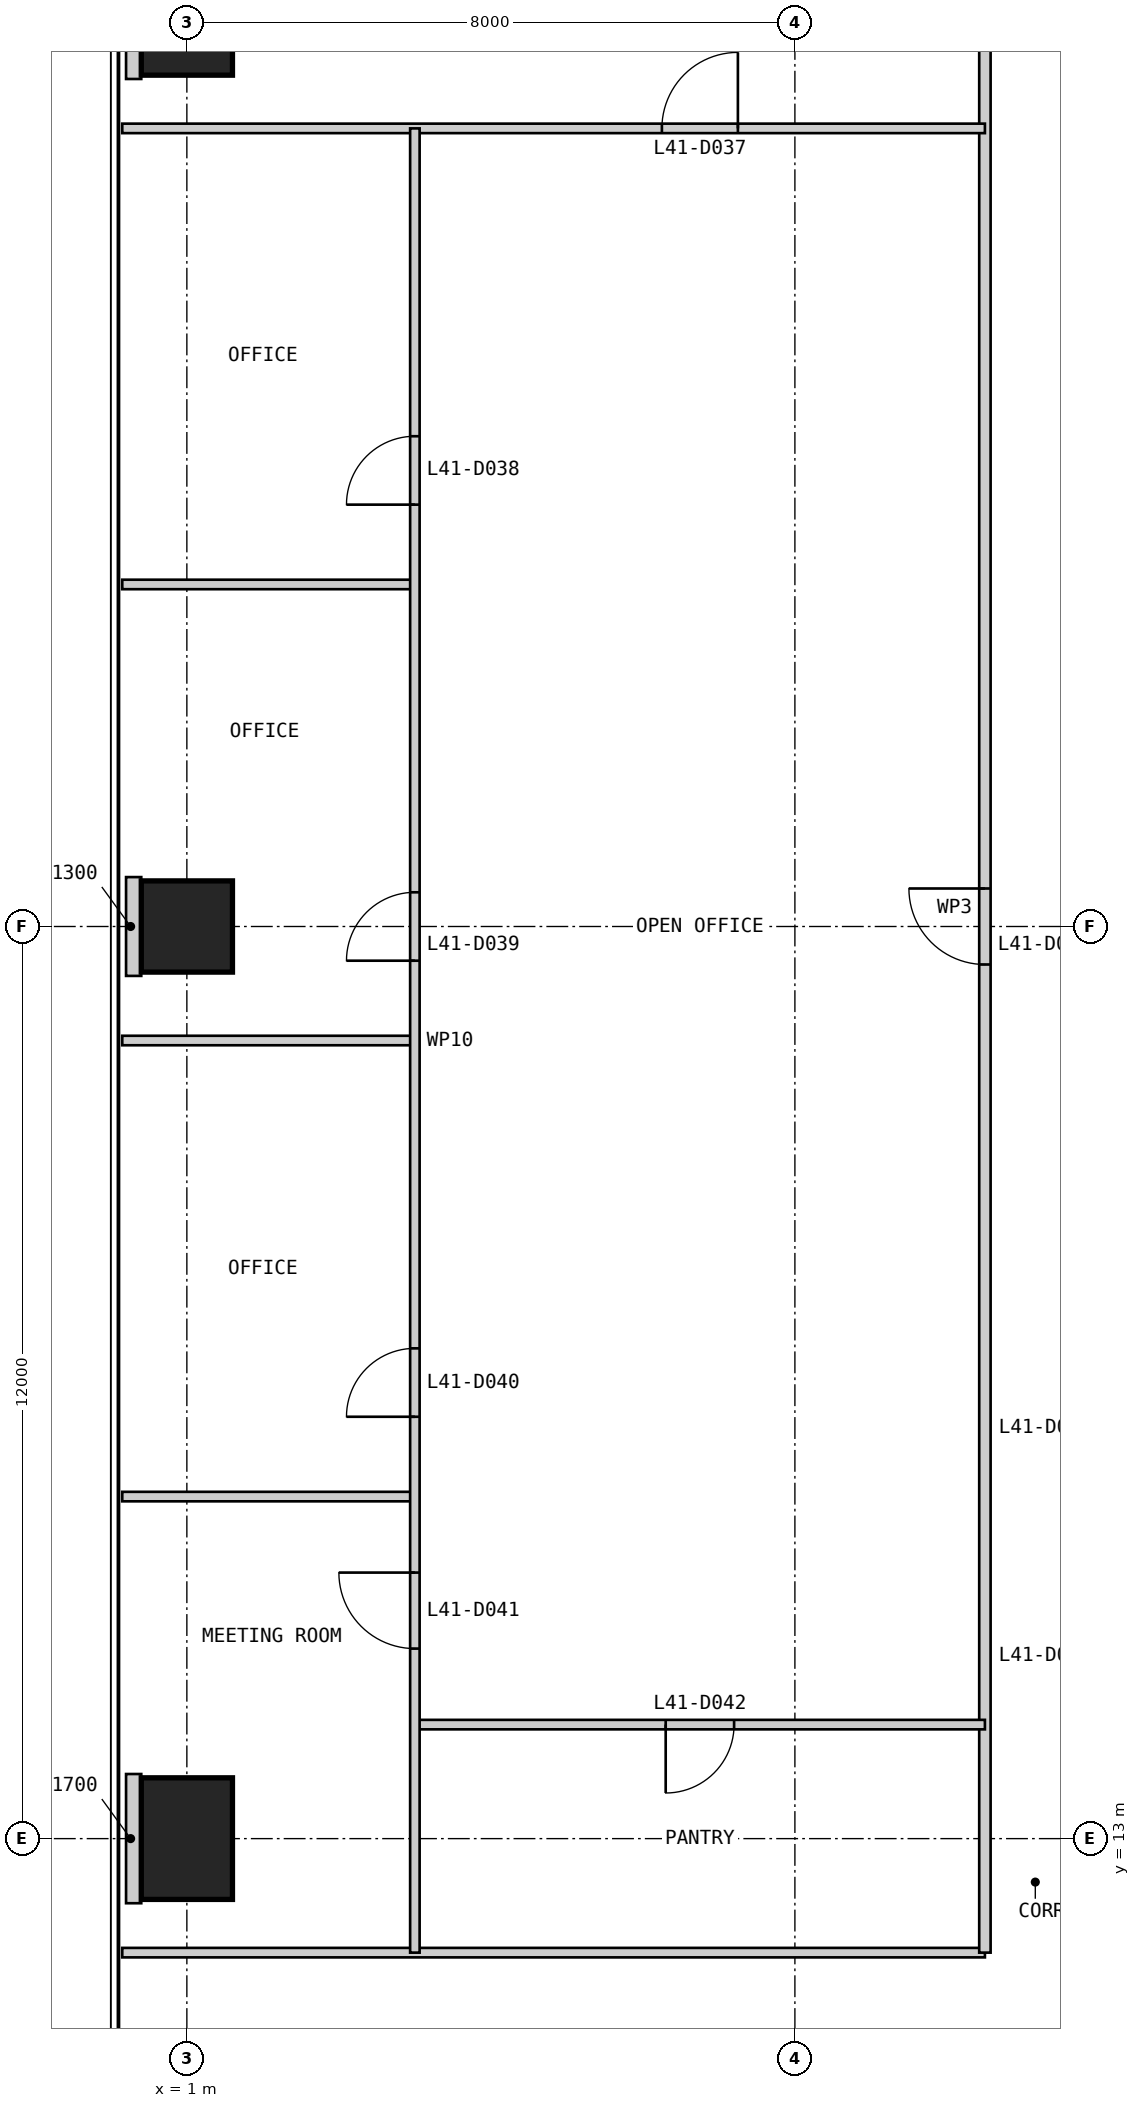
"""IFC4 building model, lengths in metres.
Left out: names, types, materials, properties, quantities, classifications, styles, units other than length and angle.
Written with IfcOpenShell. Run it as: python <this file> out.ifc"""

import sys

from ifc_helpers import new_model, si_unit, direction, frame, frame_2d, origin, origin_2d, place, context, subcontext, project, spatial, rectangle, extrude, element, fill, save


model = new_model("IFC4")
c1 = context("Model", 3, precision=1e-05, world=origin(), true_north=direction((0.0, 1.0)))
c2 = subcontext(c1, "Body", "Model", "MODEL_VIEW")
j1 = project(units=[si_unit("LENGTHUNIT", "METRE"), si_unit("PLANEANGLEUNIT", "RADIAN")], contexts=[c1])
p1 = place(None, origin())
s1 = spatial("IfcSite", under=j1, at=p1, CompositionType="ELEMENT")
p2 = place(p1, origin())
s2 = spatial("IfcBuilding", under=s1, at=p2, CompositionType="ELEMENT")
p3 = place(p2, frame((0.0, 0.0, 177.8)))
s3 = spatial("IfcBuildingStorey", under=s2, at=p3, CompositionType="ELEMENT", Elevation=177.8)
p4 = place(p3, frame((1.0, 37.0, 0.0), z_axis=(0.0, 0.0, 1.0), x_axis=(1.0, 0.0, 0.0)))
e1 = element("IfcColumn", 1, at=p4, inside=s3, PredefinedType="COLUMN", context=c2, shape_type="SweptSolid", body=[
    extrude(rectangle(XDim=1.2, YDim=1.6, at=origin_2d()), origin(), (0.0, 0.0, 1.0), 4.0),
])
p5 = place(p3, frame((1.0, 25.0, 0.0), z_axis=(0.0, 0.0, 1.0), x_axis=(1.0, 0.0, 0.0)))
e2 = element("IfcColumn", 2, at=p5, inside=s3, PredefinedType="COLUMN", context=c2, shape_type="SweptSolid", body=[
    extrude(rectangle(XDim=1.2, YDim=1.2, at=origin_2d()), origin(), (0.0, 0.0, 1.0), 4.0),
])
p6 = place(p3, frame((1.0, 13.0, 0.0), z_axis=(0.0, 0.0, 1.0), x_axis=(1.0, 0.0, 0.0)))
e3 = element("IfcColumn", 3, at=p6, inside=s3, PredefinedType="COLUMN", context=c2, shape_type="SweptSolid", body=[
    extrude(rectangle(XDim=1.2, YDim=1.6, at=origin_2d()), origin(), (0.0, 0.0, 1.0), 4.0),
])
p7 = place(p3, frame((0.15, 11.5, 0.0), z_axis=(0.0, 0.0, 1.0), x_axis=(1.0, 0.0, 0.0)))
e4 = element("IfcWall", 4, at=p7, inside=s3, PredefinedType="PARTITIONING", context=c2, shape_type="SweptSolid", body=[
    extrude(rectangle(XDim=11.35, YDim=0.125, at=frame_2d((5.675, 0.0))), origin(), (0.0, 0.0, 1.0), 3.85),
])
p8 = place(p3, frame((11.5, 38.5, 0.0), z_axis=(0.0, 0.0, 1.0), x_axis=(0.0, -1.0, 0.0)))
e5 = element("IfcWall", 5, at=p8, inside=s3, PredefinedType="PARTITIONING", context=c2, shape_type="SweptSolid", body=[
    extrude(rectangle(XDim=27.0, YDim=0.15, at=frame_2d((13.5, 0.0))), origin(), (0.0, 0.0, 1.0), 3.85),
])
p9 = place(p8, frame((13.0, 0.0, 0.0)))
e6 = element("IfcOpeningElement", 6, at=p9, cuts=e5, PredefinedType="OPENING", context=c2, shape_type="SweptSolid", body=[
    extrude(rectangle(XDim=1.0, YDim=2.2, at=frame_2d((0.5, 1.1))), frame((0.0, 0.085, 0.0), z_axis=(0.0, -1.0, 0.0), x_axis=(1.0, 0.0, 0.0)), (0.0, 0.0, 1.0), 0.17),
])
p10 = place(p3, frame((0.15, 35.5, 0.0), z_axis=(0.0, 0.0, 1.0), x_axis=(1.0, 0.0, 0.0)))
e7 = element("IfcWall", 7, at=p10, inside=s3, PredefinedType="PARTITIONING", context=c2, shape_type="SweptSolid", body=[
    extrude(rectangle(XDim=11.35, YDim=0.125, at=frame_2d((5.675, 0.0))), origin(), (0.0, 0.0, 1.0), 3.85),
])
p11 = place(p10, frame((7.1, 0.0, 0.0)))
e8 = element("IfcOpeningElement", 8, at=p11, cuts=e7, PredefinedType="OPENING", context=c2, shape_type="SweptSolid", body=[
    extrude(rectangle(XDim=1.0, YDim=2.2, at=frame_2d((0.5, 1.1))), frame((0.0, 0.073, 0.0), z_axis=(0.0, -1.0, 0.0), x_axis=(1.0, 0.0, 0.0)), (0.0, 0.0, 1.0), 0.145),
])
for number, where, z_axis, x_axis in (
    (9, (0.15, 29.5, 0.0), (0.0, 0.0, 1.0), (1.0, 0.0, 0.0)),
    (10, (0.15, 23.5, 0.0), (0.0, 0.0, 1.0), (1.0, 0.0, 0.0)),
    (11, (0.15, 17.5, 0.0), (0.0, 0.0, 1.0), (1.0, 0.0, 0.0)),
):
    element("IfcWall", number, at=place(p3, frame(where, z_axis=z_axis, x_axis=x_axis)), inside=s3, PredefinedType="PARTITIONING", context=c2, shape_type="SweptSolid", body=[
        extrude(rectangle(XDim=3.85, YDim=0.125, at=frame_2d((1.925, 0.0))), origin(), (0.0, 0.0, 1.0), 3.85),
    ])
p12 = place(p3, frame((4.0, 14.5, 0.0), z_axis=(0.0, 0.0, 1.0), x_axis=(1.0, 0.0, 0.0)))
e12 = element("IfcWall", 12, at=p12, inside=s3, PredefinedType="PARTITIONING", context=c2, shape_type="SweptSolid", body=[
    extrude(rectangle(XDim=7.5, YDim=0.125, at=frame_2d((3.75, 0.0))), origin(), (0.0, 0.0, 1.0), 3.85),
])
p13 = place(p12, frame((3.3, 0.0, 0.0)))
e13 = element("IfcOpeningElement", 13, at=p13, cuts=e12, PredefinedType="OPENING", context=c2, shape_type="SweptSolid", body=[
    extrude(rectangle(XDim=0.9, YDim=2.2, at=frame_2d((0.45, 1.1))), frame((0.0, 0.073, 0.0), z_axis=(0.0, -1.0, 0.0), x_axis=(1.0, 0.0, 0.0)), (0.0, 0.0, 1.0), 0.145),
])
p14 = place(p3, frame((4.0, 35.5, 0.0), z_axis=(0.0, 0.0, 1.0), x_axis=(0.0, -1.0, 0.0)))
e14 = element("IfcWall", 14, at=p14, inside=s3, PredefinedType="PARTITIONING", context=c2, shape_type="SweptSolid", body=[
    extrude(rectangle(XDim=24.0, YDim=0.125, at=frame_2d((12.0, 0.0))), origin(), (0.0, 0.0, 1.0), 3.238),
])
p15 = place(p14, frame((4.05, 0.0, 0.0)))
e15 = element("IfcOpeningElement", 15, at=p15, cuts=e14, PredefinedType="OPENING", context=c2, shape_type="SweptSolid", body=[
    extrude(rectangle(XDim=0.9, YDim=2.2, at=frame_2d((0.45, 1.1))), frame((0.0, 0.073, 0.0), z_axis=(0.0, -1.0, 0.0), x_axis=(1.0, 0.0, 0.0)), (0.0, 0.0, 1.0), 0.145),
])
p16 = place(p14, frame((10.05, 0.0, 0.0)))
e16 = element("IfcOpeningElement", 16, at=p16, cuts=e14, PredefinedType="OPENING", context=c2, shape_type="SweptSolid", body=[
    extrude(rectangle(XDim=0.9, YDim=2.2, at=frame_2d((0.45, 1.1))), frame((0.0, 0.073, 0.0), z_axis=(0.0, -1.0, 0.0), x_axis=(1.0, 0.0, 0.0)), (0.0, 0.0, 1.0), 0.145),
])
p17 = place(p14, frame((16.05, 0.0, 0.0)))
e17 = element("IfcOpeningElement", 17, at=p17, cuts=e14, PredefinedType="OPENING", context=c2, shape_type="SweptSolid", body=[
    extrude(rectangle(XDim=0.9, YDim=2.2, at=frame_2d((0.45, 1.1))), frame((0.0, 0.073, 0.0), z_axis=(0.0, -1.0, 0.0), x_axis=(1.0, 0.0, 0.0)), (0.0, 0.0, 1.0), 0.145),
])
p18 = place(p14, frame((19.0, 0.0, 0.0)))
e18 = element("IfcOpeningElement", 18, at=p18, cuts=e14, PredefinedType="OPENING", context=c2, shape_type="SweptSolid", body=[
    extrude(rectangle(XDim=1.0, YDim=2.2, at=frame_2d((0.5, 1.1))), frame((0.0, 0.073, 0.0), z_axis=(0.0, -1.0, 0.0), x_axis=(1.0, 0.0, 0.0)), (0.0, 0.0, 1.0), 0.145),
])
p19 = place(p3, frame((0.2, 37.0, 0.0), z_axis=(0.0, 0.0, 1.0), x_axis=(1.0, 0.0, 0.0)))
e19 = element("IfcWall", 19, at=p19, inside=s3, PredefinedType="PARTITIONING", context=c2, shape_type="SweptSolid", body=[
    extrude(rectangle(XDim=0.2, YDim=1.7, at=frame_2d((0.1, 0.0))), origin(), (0.0, 0.0, 1.0), 3.85),
])
p20 = place(p3, frame((0.2, 25.0, 0.0), z_axis=(0.0, 0.0, 1.0), x_axis=(1.0, 0.0, 0.0)))
e20 = element("IfcWall", 20, at=p20, inside=s3, PredefinedType="PARTITIONING", context=c2, shape_type="SweptSolid", body=[
    extrude(rectangle(XDim=0.2, YDim=1.3, at=frame_2d((0.1, 0.0))), origin(), (0.0, 0.0, 1.0), 3.85),
])
p21 = place(p3, frame((0.2, 13.0, 0.0), z_axis=(0.0, 0.0, 1.0), x_axis=(1.0, 0.0, 0.0)))
e21 = element("IfcWall", 21, at=p21, inside=s3, PredefinedType="PARTITIONING", context=c2, shape_type="SweptSolid", body=[
    extrude(rectangle(XDim=0.2, YDim=1.7, at=frame_2d((0.1, 0.0))), origin(), (0.0, 0.0, 1.0), 3.85),
])
p22 = place(p9, frame((1.0, 0.0, 0.0), z_axis=(0.0, 0.0, 1.0), x_axis=(-1.0, 0.0, 0.0)))
e22 = element("IfcDoor", 22, at=p22, inside=s3, OperationType="SINGLE_SWING_RIGHT", PredefinedType="DOOR", context=c2, shape_type="SweptSolid", body=[
    extrude(rectangle(XDim=1.0, YDim=2.2, at=frame_2d((0.5, 1.1))), frame((0.0, 0.025, 0.0), z_axis=(0.0, -1.0, 0.0), x_axis=(1.0, 0.0, 0.0)), (0.0, 0.0, 1.0), 0.05),
])
fill(e6, e22)
p23 = place(p11, origin())
e23 = element("IfcDoor", 23, at=p23, inside=s3, OperationType="SINGLE_SWING_RIGHT", PredefinedType="DOOR", context=c2, shape_type="SweptSolid", body=[
    extrude(rectangle(XDim=1.0, YDim=2.2, at=frame_2d((0.5, 1.1))), frame((0.0, 0.025, 0.0), z_axis=(0.0, -1.0, 0.0), x_axis=(1.0, 0.0, 0.0)), (0.0, 0.0, 1.0), 0.05),
])
fill(e8, e23)
p24 = place(p15, frame((0.9, 0.0, 0.0), z_axis=(0.0, 0.0, 1.0), x_axis=(-1.0, 0.0, 0.0)))
e24 = element("IfcDoor", 24, at=p24, inside=s3, OperationType="SINGLE_SWING_LEFT", PredefinedType="DOOR", context=c2, shape_type="SweptSolid", body=[
    extrude(rectangle(XDim=0.9, YDim=2.2, at=frame_2d((0.45, 1.1))), frame((0.0, 0.025, 0.0), z_axis=(0.0, -1.0, 0.0), x_axis=(1.0, 0.0, 0.0)), (0.0, 0.0, 1.0), 0.05),
])
fill(e15, e24)
p25 = place(p16, frame((0.9, 0.0, 0.0), z_axis=(0.0, 0.0, 1.0), x_axis=(-1.0, 0.0, 0.0)))
e25 = element("IfcDoor", 25, at=p25, inside=s3, OperationType="SINGLE_SWING_LEFT", PredefinedType="DOOR", context=c2, shape_type="SweptSolid", body=[
    extrude(rectangle(XDim=0.9, YDim=2.2, at=frame_2d((0.45, 1.1))), frame((0.0, 0.025, 0.0), z_axis=(0.0, -1.0, 0.0), x_axis=(1.0, 0.0, 0.0)), (0.0, 0.0, 1.0), 0.05),
])
fill(e16, e25)
p26 = place(p17, frame((0.9, 0.0, 0.0), z_axis=(0.0, 0.0, 1.0), x_axis=(-1.0, 0.0, 0.0)))
e26 = element("IfcDoor", 26, at=p26, inside=s3, OperationType="SINGLE_SWING_LEFT", PredefinedType="DOOR", context=c2, shape_type="SweptSolid", body=[
    extrude(rectangle(XDim=0.9, YDim=2.2, at=frame_2d((0.45, 1.1))), frame((0.0, 0.025, 0.0), z_axis=(0.0, -1.0, 0.0), x_axis=(1.0, 0.0, 0.0)), (0.0, 0.0, 1.0), 0.05),
])
fill(e17, e26)
p27 = place(p18, frame((1.0, 0.0, 0.0), z_axis=(0.0, 0.0, 1.0), x_axis=(-1.0, 0.0, 0.0)))
e27 = element("IfcDoor", 27, at=p27, inside=s3, OperationType="SINGLE_SWING_RIGHT", PredefinedType="DOOR", context=c2, shape_type="SweptSolid", body=[
    extrude(rectangle(XDim=1.0, YDim=2.2, at=frame_2d((0.5, 1.1))), frame((0.0, 0.025, 0.0), z_axis=(0.0, -1.0, 0.0), x_axis=(1.0, 0.0, 0.0)), (0.0, 0.0, 1.0), 0.05),
])
fill(e18, e27)
p28 = place(p13, frame((0.9, 0.0, 0.0), z_axis=(0.0, 0.0, 1.0), x_axis=(-1.0, 0.0, 0.0)))
e28 = element("IfcDoor", 28, at=p28, inside=s3, OperationType="SINGLE_SWING_RIGHT", PredefinedType="DOOR", context=c2, shape_type="SweptSolid", body=[
    extrude(rectangle(XDim=0.9, YDim=2.2, at=frame_2d((0.45, 1.1))), frame((0.0, 0.025, 0.0), z_axis=(0.0, -1.0, 0.0), x_axis=(1.0, 0.0, 0.0)), (0.0, 0.0, 1.0), 0.05),
])
fill(e13, e28)
save(model, sys.argv[1])
